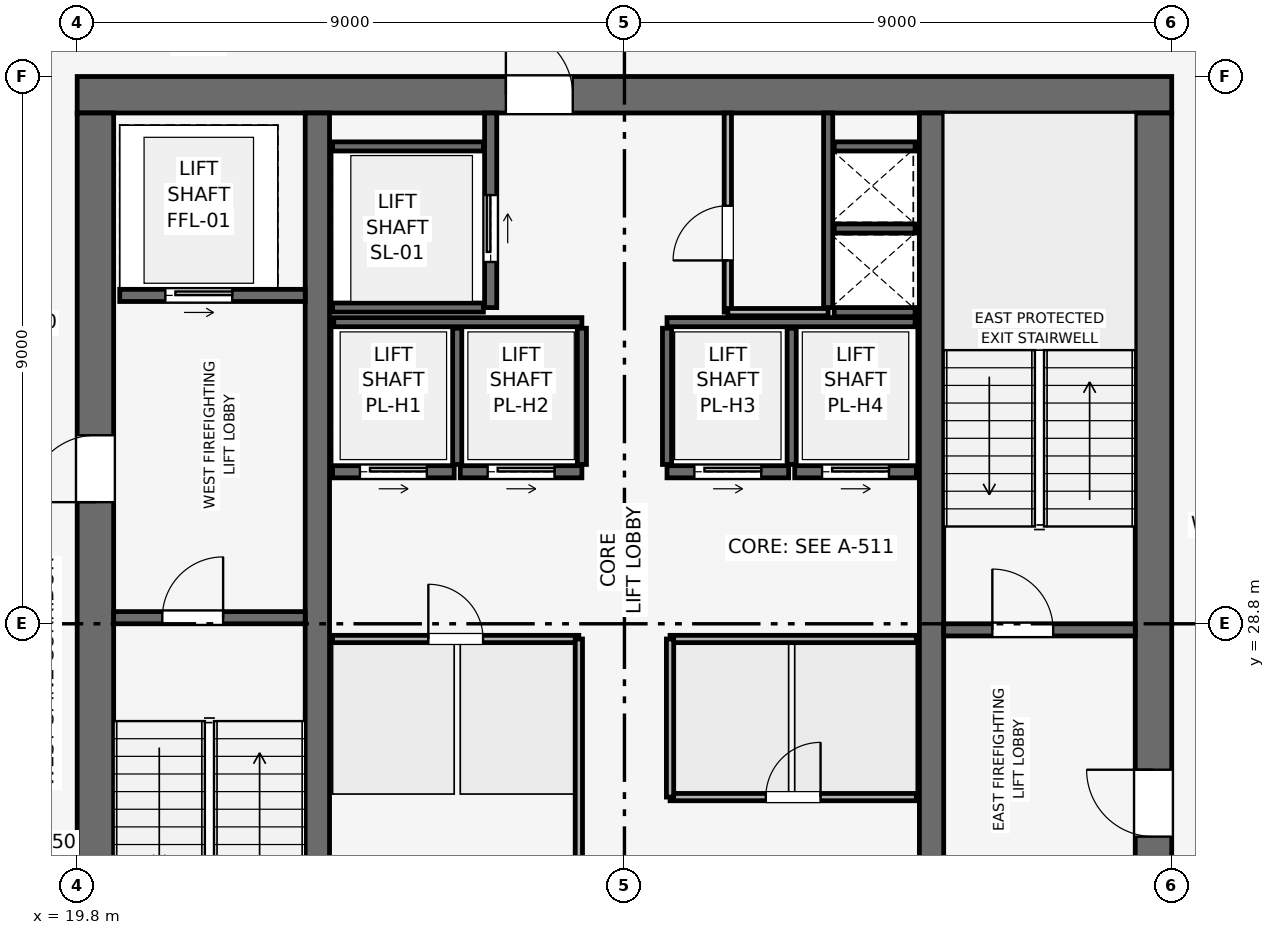
"""IFC4 building model, lengths in metres.
Left out: names, types, materials, properties, quantities, classifications, styles, units other than length and angle.
Written with IfcOpenShell. Run it as: python <this file> out.ifc"""

import sys

from ifc_helpers import new_model, si_unit, direction, frame, frame_2d, origin, place, context, subcontext, project, spatial, rectangle, extrude, element, fill, save


model = new_model("IFC4")
c1 = context("Model", 3, precision=1e-05, world=origin(), true_north=direction((0.0, 1.0)))
c2 = subcontext(c1, "Body", "Model", "MODEL_VIEW")
j1 = project(units=[si_unit("LENGTHUNIT", "METRE"), si_unit("PLANEANGLEUNIT", "RADIAN")], contexts=[c1])
p1 = place(None, origin())
s1 = spatial("IfcSite", under=j1, at=p1, CompositionType="ELEMENT")
p2 = place(p1, origin())
s2 = spatial("IfcBuilding", under=s1, at=p2, CompositionType="ELEMENT")
p3 = place(p2, frame((0.0, 0.0, 314.25)))
s3 = spatial("IfcBuildingStorey", under=s2, at=p3, CompositionType="ELEMENT", Elevation=314.25)
p4 = place(p3, frame((19.8, 37.5, 0.0), z_axis=(0.0, 0.0, 1.0), x_axis=(1.0, 0.0, 0.0)))
e1 = element("IfcWall", 1, at=p4, inside=s3, PredefinedType="SHEAR", context=c2, shape_type="SweptSolid", body=[
    extrude(rectangle(XDim=18.0, YDim=0.6, at=frame_2d((9.0, 0.0))), origin(), (0.0, 0.0, 1.0), 3.75),
])
p5 = place(p4, frame((7.05, 0.0, 0.0)))
e2 = element("IfcOpeningElement", 2, at=p5, cuts=e1, PredefinedType="OPENING", context=c2, shape_type="SweptSolid", body=[
    extrude(rectangle(XDim=1.1, YDim=2.15, at=frame_2d((0.55, 1.075))), frame((0.0, 0.31, 0.0), z_axis=(0.0, -1.0, 0.0), x_axis=(1.0, 0.0, 0.0)), (0.0, 0.0, 1.0), 0.62),
])
p6 = place(p3, frame((20.1, 20.4, 0.0), z_axis=(0.0, 0.0, 1.0), x_axis=(0.0, 1.0, 0.0)))
e3 = element("IfcWall", 3, at=p6, inside=s3, PredefinedType="SHEAR", context=c2, shape_type="SweptSolid", body=[
    extrude(rectangle(XDim=16.8, YDim=0.6, at=frame_2d((8.4, 0.0))), origin(), (0.0, 0.0, 1.0), 3.75),
])
p7 = place(p6, frame((10.4, 0.0, 0.0)))
e4 = element("IfcOpeningElement", 4, at=p7, cuts=e3, PredefinedType="OPENING", context=c2, shape_type="SweptSolid", body=[
    extrude(rectangle(XDim=1.1, YDim=2.15, at=frame_2d((0.55, 1.075))), frame((0.0, 0.31, 0.0), z_axis=(0.0, -1.0, 0.0), x_axis=(1.0, 0.0, 0.0)), (0.0, 0.0, 1.0), 0.62),
])
p8 = place(p3, frame((37.5, 20.4, 0.0), z_axis=(0.0, 0.0, 1.0), x_axis=(0.0, 1.0, 0.0)))
e5 = element("IfcWall", 5, at=p8, inside=s3, PredefinedType="SHEAR", context=c2, shape_type="SweptSolid", body=[
    extrude(rectangle(XDim=16.8, YDim=0.6, at=frame_2d((8.4, 0.0))), origin(), (0.0, 0.0, 1.0), 3.75),
])
p9 = place(p8, frame((4.9, 0.0, 0.0)))
e6 = element("IfcOpeningElement", 6, at=p9, cuts=e5, PredefinedType="OPENING", context=c2, shape_type="SweptSolid", body=[
    extrude(rectangle(XDim=1.1, YDim=2.15, at=frame_2d((0.55, 1.075))), frame((0.0, 0.31, 0.0), z_axis=(0.0, -1.0, 0.0), x_axis=(1.0, 0.0, 0.0)), (0.0, 0.0, 1.0), 0.62),
])
for number, where, z_axis, x_axis in (
    (7, (23.75, 20.4, 0.0), (0.0, 0.0, 1.0), (0.0, 1.0, 0.0)),
    (8, (33.85, 20.4, 0.0), (0.0, 0.0, 1.0), (0.0, 1.0, 0.0)),
):
    element("IfcWall", number, at=place(p3, frame(where, z_axis=z_axis, x_axis=x_axis)), inside=s3, PredefinedType="SHEAR", context=c2, shape_type="SweptSolid", body=[
        extrude(rectangle(XDim=16.8, YDim=0.4, at=frame_2d((8.4, 0.0))), origin(), (0.0, 0.0, 1.0), 3.75),
    ])
p10 = place(p3, frame((20.4, 28.9, 0.0), z_axis=(0.0, 0.0, 1.0), x_axis=(1.0, 0.0, 0.0)))
e9 = element("IfcWall", 9, at=p10, inside=s3, PredefinedType="SHEAR", context=c2, shape_type="SweptSolid", body=[
    extrude(rectangle(XDim=3.15, YDim=0.2, at=frame_2d((1.575, 0.0))), origin(), (0.0, 0.0, 1.0), 3.51),
])
p11 = place(p10, frame((0.8, 0.0, 0.0)))
e10 = element("IfcOpeningElement", 10, at=p11, cuts=e9, PredefinedType="OPENING", context=c2, shape_type="SweptSolid", body=[
    extrude(rectangle(XDim=1.0, YDim=2.1, at=frame_2d((0.5, 1.05))), frame((0.0, 0.11, 0.0), z_axis=(0.0, -1.0, 0.0), x_axis=(1.0, 0.0, 0.0)), (0.0, 0.0, 1.0), 0.22),
])
p12 = place(p3, frame((34.05, 28.7, 0.0), z_axis=(0.0, 0.0, 1.0), x_axis=(1.0, 0.0, 0.0)))
e11 = element("IfcWall", 11, at=p12, inside=s3, PredefinedType="SHEAR", context=c2, shape_type="SweptSolid", body=[
    extrude(rectangle(XDim=3.15, YDim=0.2, at=frame_2d((1.575, 0.0))), origin(), (0.0, 0.0, 1.0), 3.51),
])
p13 = place(p12, frame((0.8, 0.0, 0.0)))
e12 = element("IfcOpeningElement", 12, at=p13, cuts=e11, PredefinedType="OPENING", context=c2, shape_type="SweptSolid", body=[
    extrude(rectangle(XDim=1.0, YDim=2.1, at=frame_2d((0.5, 1.05))), frame((0.0, 0.11, 0.0), z_axis=(0.0, -1.0, 0.0), x_axis=(1.0, 0.0, 0.0)), (0.0, 0.0, 1.0), 0.22),
])
p14 = place(p3, frame((32.15, 34.0, 0.0), z_axis=(0.0, 0.0, 1.0), x_axis=(0.0, 1.0, 0.0)))
e13 = element("IfcWall", 13, at=p14, inside=s3, PredefinedType="SHEAR", context=c2, shape_type="SweptSolid", body=[
    extrude(rectangle(XDim=3.2, YDim=0.15, at=frame_2d((1.6, 0.0))), origin(), (0.0, 0.0, 1.0), 3.51),
])
for number, where, z_axis, x_axis in (
    (14, (32.25, 33.925, 0.0), (0.0, 0.0, 1.0), (1.0, 0.0, 0.0)),
    (15, (32.25, 35.3, 0.0), (0.0, 0.0, 1.0), (1.0, 0.0, 0.0)),
):
    element("IfcWall", number, at=place(p3, frame(where, z_axis=z_axis, x_axis=x_axis)), inside=s3, PredefinedType="SHEAR", context=c2, shape_type="SweptSolid", body=[
        extrude(rectangle(XDim=1.33, YDim=0.15, at=frame_2d((0.665, 0.0))), origin(), (0.0, 0.0, 1.0), 3.51),
    ])
p15 = place(p3, frame((20.5, 34.2, 0.0), z_axis=(0.0, 0.0, 1.0), x_axis=(1.0, 0.0, 0.0)))
e16 = element("IfcWall", 16, at=p15, inside=s3, PredefinedType="SHEAR", context=c2, shape_type="SweptSolid", body=[
    extrude(rectangle(XDim=3.05, YDim=0.2, at=frame_2d((1.525, 0.0))), origin(), (0.0, 0.0, 1.0), 3.51),
])
p16 = place(p15, frame((0.75, 0.0, 0.0)))
e17 = element("IfcOpeningElement", 17, at=p16, cuts=e16, PredefinedType="OPENING", context=c2, shape_type="SweptSolid", body=[
    extrude(rectangle(XDim=1.1, YDim=2.15, at=frame_2d((0.55, 1.075))), frame((0.0, 0.11, 0.0), z_axis=(0.0, -1.0, 0.0), x_axis=(1.0, 0.0, 0.0)), (0.0, 0.0, 1.0), 0.22),
])
p17 = place(p3, frame((26.6, 34.0, 0.0), z_axis=(0.0, 0.0, 1.0), x_axis=(0.0, 1.0, 0.0)))
e18 = element("IfcWall", 18, at=p17, inside=s3, PredefinedType="SHEAR", context=c2, shape_type="SweptSolid", body=[
    extrude(rectangle(XDim=3.2, YDim=0.2, at=frame_2d((1.6, 0.0))), origin(), (0.0, 0.0, 1.0), 3.51),
])
p18 = place(p17, frame((0.75, 0.0, 0.0)))
e19 = element("IfcOpeningElement", 19, at=p18, cuts=e18, PredefinedType="OPENING", context=c2, shape_type="SweptSolid", body=[
    extrude(rectangle(XDim=1.1, YDim=2.15, at=frame_2d((0.55, 1.075))), frame((0.0, 0.11, 0.0), z_axis=(0.0, -1.0, 0.0), x_axis=(1.0, 0.0, 0.0)), (0.0, 0.0, 1.0), 0.22),
])
for number, where, z_axis, x_axis in (
    (20, (24.0, 34.0, 0.0), (0.0, 0.0, 1.0), (1.0, 0.0, 0.0)),
    (21, (24.0, 36.65, 0.0), (0.0, 0.0, 1.0), (1.0, 0.0, 0.0)),
):
    element("IfcWall", number, at=place(p3, frame(where, z_axis=z_axis, x_axis=x_axis)), inside=s3, PredefinedType="SHEAR", context=c2, shape_type="SweptSolid", body=[
        extrude(rectangle(XDim=2.48, YDim=0.15, at=frame_2d((1.24, 0.0))), origin(), (0.0, 0.0, 1.0), 3.51),
    ])
p19 = place(p3, frame((24.0, 31.3, 0.0), z_axis=(0.0, 0.0, 1.0), x_axis=(1.0, 0.0, 0.0)))
e22 = element("IfcWall", 22, at=p19, inside=s3, PredefinedType="SHEAR", context=c2, shape_type="SweptSolid", body=[
    extrude(rectangle(XDim=2.0, YDim=0.2, at=frame_2d((1.0, 0.0))), origin(), (0.0, 0.0, 1.0), 3.51),
])
p20 = place(p19, frame((0.45, 0.0, 0.0)))
e23 = element("IfcOpeningElement", 23, at=p20, cuts=e22, PredefinedType="OPENING", context=c2, shape_type="SweptSolid", body=[
    extrude(rectangle(XDim=1.1, YDim=2.15, at=frame_2d((0.55, 1.075))), frame((0.0, 0.11, 0.0), z_axis=(0.0, -1.0, 0.0), x_axis=(1.0, 0.0, 0.0)), (0.0, 0.0, 1.0), 0.22),
])
p21 = place(p3, frame((26.1, 31.3, 0.0), z_axis=(0.0, 0.0, 1.0), x_axis=(1.0, 0.0, 0.0)))
e24 = element("IfcWall", 24, at=p21, inside=s3, PredefinedType="SHEAR", context=c2, shape_type="SweptSolid", body=[
    extrude(rectangle(XDim=2.0, YDim=0.2, at=frame_2d((1.0, 0.0))), origin(), (0.0, 0.0, 1.0), 3.51),
])
p22 = place(p21, frame((0.45, 0.0, 0.0)))
e25 = element("IfcOpeningElement", 25, at=p22, cuts=e24, PredefinedType="OPENING", context=c2, shape_type="SweptSolid", body=[
    extrude(rectangle(XDim=1.1, YDim=2.15, at=frame_2d((0.55, 1.075))), frame((0.0, 0.11, 0.0), z_axis=(0.0, -1.0, 0.0), x_axis=(1.0, 0.0, 0.0)), (0.0, 0.0, 1.0), 0.22),
])
p23 = place(p3, frame((29.5, 31.3, 0.0), z_axis=(0.0, 0.0, 1.0), x_axis=(1.0, 0.0, 0.0)))
e26 = element("IfcWall", 26, at=p23, inside=s3, PredefinedType="SHEAR", context=c2, shape_type="SweptSolid", body=[
    extrude(rectangle(XDim=2.0, YDim=0.2, at=frame_2d((1.0, 0.0))), origin(), (0.0, 0.0, 1.0), 3.51),
])
p24 = place(p23, frame((0.45, 0.0, 0.0)))
e27 = element("IfcOpeningElement", 27, at=p24, cuts=e26, PredefinedType="OPENING", context=c2, shape_type="SweptSolid", body=[
    extrude(rectangle(XDim=1.1, YDim=2.15, at=frame_2d((0.55, 1.075))), frame((0.0, 0.11, 0.0), z_axis=(0.0, -1.0, 0.0), x_axis=(1.0, 0.0, 0.0)), (0.0, 0.0, 1.0), 0.22),
])
p25 = place(p3, frame((31.6, 31.3, 0.0), z_axis=(0.0, 0.0, 1.0), x_axis=(1.0, 0.0, 0.0)))
e28 = element("IfcWall", 28, at=p25, inside=s3, PredefinedType="SHEAR", context=c2, shape_type="SweptSolid", body=[
    extrude(rectangle(XDim=2.0, YDim=0.2, at=frame_2d((1.0, 0.0))), origin(), (0.0, 0.0, 1.0), 3.51),
])
p26 = place(p25, frame((0.45, 0.0, 0.0)))
e29 = element("IfcOpeningElement", 29, at=p26, cuts=e28, PredefinedType="OPENING", context=c2, shape_type="SweptSolid", body=[
    extrude(rectangle(XDim=1.1, YDim=2.15, at=frame_2d((0.55, 1.075))), frame((0.0, 0.11, 0.0), z_axis=(0.0, -1.0, 0.0), x_axis=(1.0, 0.0, 0.0)), (0.0, 0.0, 1.0), 0.22),
])
p27 = place(p3, frame((32.25, 36.65, 0.0), z_axis=(0.0, 0.0, 1.0), x_axis=(1.0, 0.0, 0.0)))
e30 = element("IfcWall", 30, at=p27, inside=s3, PredefinedType="SHEAR", context=c2, shape_type="SweptSolid", body=[
    extrude(rectangle(XDim=1.33, YDim=0.15, at=frame_2d((0.665, 0.0))), origin(), (0.0, 0.0, 1.0), 3.51),
])
for number, where, z_axis, x_axis in (
    (31, (24.02, 33.76, 0.0), (0.0, 0.0, 1.0), (1.0, 0.0, 0.0)),
    (32, (29.5, 33.76, 0.0), (0.0, 0.0, 1.0), (1.0, 0.0, 0.0)),
):
    element("IfcWall", number, at=place(p3, frame(where, z_axis=z_axis, x_axis=x_axis)), inside=s3, PredefinedType="SHEAR", context=c2, shape_type="SweptSolid", body=[
        extrude(rectangle(XDim=4.08, YDim=0.15, at=frame_2d((2.04, 0.0))), origin(), (0.0, 0.0, 1.0), 3.51),
    ])
for number, where, z_axis, x_axis in (
    (33, (26.05, 31.42, 0.0), (0.0, 0.0, 1.0), (0.0, 1.0, 0.0)),
    (34, (28.1, 31.42, 0.0), (0.0, 0.0, 1.0), (0.0, 1.0, 0.0)),
    (35, (29.5, 31.42, 0.0), (0.0, 0.0, 1.0), (0.0, 1.0, 0.0)),
    (36, (31.55, 31.42, 0.0), (0.0, 0.0, 1.0), (0.0, 1.0, 0.0)),
):
    element("IfcWall", number, at=place(p3, frame(where, z_axis=z_axis, x_axis=x_axis)), inside=s3, PredefinedType="SHEAR", context=c2, shape_type="SweptSolid", body=[
        extrude(rectangle(XDim=2.24, YDim=0.15, at=frame_2d((1.12, 0.0))), origin(), (0.0, 0.0, 1.0), 3.51),
    ])
p28 = place(p3, frame((30.5, 33.925, 0.0), z_axis=(0.0, 0.0, 1.0), x_axis=(0.0, 1.0, 0.0)))
e37 = element("IfcWall", 37, at=p28, inside=s3, PredefinedType="PARTITIONING", context=c2, shape_type="SweptSolid", body=[
    extrude(rectangle(XDim=3.275, YDim=0.12, at=frame_2d((1.637, 0.0))), origin(), (0.0, 0.0, 1.0), 3.51),
])
p29 = place(p28, frame((0.85, 0.0, 0.0)))
e38 = element("IfcOpeningElement", 38, at=p29, cuts=e37, PredefinedType="OPENING", context=c2, shape_type="SweptSolid", body=[
    extrude(rectangle(XDim=0.9, YDim=2.1, at=frame_2d((0.45, 1.05))), frame((0.0, 0.07, 0.0), z_axis=(0.0, -1.0, 0.0), x_axis=(1.0, 0.0, 0.0)), (0.0, 0.0, 1.0), 0.14),
])
p30 = place(p3, frame((30.5, 33.925, 0.0), z_axis=(0.0, 0.0, 1.0), x_axis=(1.0, 0.0, 0.0)))
e39 = element("IfcWall", 39, at=p30, inside=s3, PredefinedType="PARTITIONING", context=c2, shape_type="SweptSolid", body=[
    extrude(rectangle(XDim=1.65, YDim=0.12, at=frame_2d((0.825, 0.0))), origin(), (0.0, 0.0, 1.0), 3.51),
])
p31 = place(p3, frame((24.0, 28.55, 0.0), z_axis=(0.0, 0.0, 1.0), x_axis=(1.0, 0.0, 0.0)))
e40 = element("IfcWall", 40, at=p31, inside=s3, PredefinedType="PARTITIONING", context=c2, shape_type="SweptSolid", body=[
    extrude(rectangle(XDim=4.05, YDim=0.12, at=frame_2d((2.025, 0.0))), origin(), (0.0, 0.0, 1.0), 3.51),
])
p32 = place(p31, frame((1.575, 0.0, 0.0)))
e41 = element("IfcOpeningElement", 41, at=p32, cuts=e40, PredefinedType="OPENING", context=c2, shape_type="SweptSolid", body=[
    extrude(rectangle(XDim=0.9, YDim=2.1, at=frame_2d((0.45, 1.05))), frame((0.0, 0.07, 0.0), z_axis=(0.0, -1.0, 0.0), x_axis=(1.0, 0.0, 0.0)), (0.0, 0.0, 1.0), 0.14),
])
p33 = place(p3, frame((28.05, 20.4, 0.0), z_axis=(0.0, 0.0, 1.0), x_axis=(0.0, 1.0, 0.0)))
e42 = element("IfcWall", 42, at=p33, inside=s3, PredefinedType="PARTITIONING", context=c2, shape_type="SweptSolid", body=[
    extrude(rectangle(XDim=8.15, YDim=0.12, at=frame_2d((4.075, 0.0))), origin(), (0.0, 0.0, 1.0), 3.51),
])
p34 = place(p3, frame((29.55, 25.95, 0.0), z_axis=(0.0, 0.0, 1.0), x_axis=(1.0, 0.0, 0.0)))
e43 = element("IfcWall", 43, at=p34, inside=s3, PredefinedType="PARTITIONING", context=c2, shape_type="SweptSolid", body=[
    extrude(rectangle(XDim=4.05, YDim=0.12, at=frame_2d((2.025, 0.0))), origin(), (0.0, 0.0, 1.0), 3.51),
])
p35 = place(p34, frame((1.575, 0.0, 0.0)))
e44 = element("IfcOpeningElement", 44, at=p35, cuts=e43, PredefinedType="OPENING", context=c2, shape_type="SweptSolid", body=[
    extrude(rectangle(XDim=0.9, YDim=2.1, at=frame_2d((0.45, 1.05))), frame((0.0, 0.07, 0.0), z_axis=(0.0, -1.0, 0.0), x_axis=(1.0, 0.0, 0.0)), (0.0, 0.0, 1.0), 0.14),
])
p36 = place(p3, frame((29.55, 28.55, 0.0), z_axis=(0.0, 0.0, 1.0), x_axis=(1.0, 0.0, 0.0)))
e45 = element("IfcWall", 45, at=p36, inside=s3, PredefinedType="PARTITIONING", context=c2, shape_type="SweptSolid", body=[
    extrude(rectangle(XDim=4.05, YDim=0.12, at=frame_2d((2.025, 0.0))), origin(), (0.0, 0.0, 1.0), 3.51),
])
p37 = place(p3, frame((29.55, 25.95, 0.0), z_axis=(0.0, 0.0, 1.0), x_axis=(0.0, 1.0, 0.0)))
e46 = element("IfcWall", 46, at=p37, inside=s3, PredefinedType="PARTITIONING", context=c2, shape_type="SweptSolid", body=[
    extrude(rectangle(XDim=2.6, YDim=0.12, at=frame_2d((1.3, 0.0))), origin(), (0.0, 0.0, 1.0), 3.51),
])
p38 = place(p11, origin())
e47 = element("IfcDoor", 47, at=p38, inside=s3, OperationType="SINGLE_SWING_RIGHT", PredefinedType="DOOR", context=c2, shape_type="SweptSolid", body=[
    extrude(rectangle(XDim=1.0, YDim=2.1, at=frame_2d((0.5, 1.05))), frame((0.0, 0.025, 0.0), z_axis=(0.0, -1.0, 0.0), x_axis=(1.0, 0.0, 0.0)), (0.0, 0.0, 1.0), 0.05),
])
fill(e10, e47)
p39 = place(p13, origin())
e48 = element("IfcDoor", 48, at=p39, inside=s3, OperationType="SINGLE_SWING_LEFT", PredefinedType="DOOR", context=c2, shape_type="SweptSolid", body=[
    extrude(rectangle(XDim=1.0, YDim=2.1, at=frame_2d((0.5, 1.05))), frame((0.0, 0.025, 0.0), z_axis=(0.0, -1.0, 0.0), x_axis=(1.0, 0.0, 0.0)), (0.0, 0.0, 1.0), 0.05),
])
fill(e12, e48)
p40 = place(p16, origin())
e49 = element("IfcDoor", 49, at=p40, inside=s3, OperationType="SLIDING_TO_RIGHT", PredefinedType="DOOR", context=c2, shape_type="SweptSolid", body=[
    extrude(rectangle(XDim=1.1, YDim=2.15, at=frame_2d((0.55, 1.075))), frame((0.0, 0.025, 0.0), z_axis=(0.0, -1.0, 0.0), x_axis=(1.0, 0.0, 0.0)), (0.0, 0.0, 1.0), 0.05),
])
fill(e17, e49)
p41 = place(p18, origin())
e50 = element("IfcDoor", 50, at=p41, inside=s3, OperationType="SLIDING_TO_RIGHT", PredefinedType="DOOR", context=c2, shape_type="SweptSolid", body=[
    extrude(rectangle(XDim=1.1, YDim=2.15, at=frame_2d((0.55, 1.075))), frame((0.0, 0.025, 0.0), z_axis=(0.0, -1.0, 0.0), x_axis=(1.0, 0.0, 0.0)), (0.0, 0.0, 1.0), 0.05),
])
fill(e19, e50)
p42 = place(p20, origin())
e51 = element("IfcDoor", 51, at=p42, inside=s3, OperationType="SLIDING_TO_RIGHT", PredefinedType="DOOR", context=c2, shape_type="SweptSolid", body=[
    extrude(rectangle(XDim=1.1, YDim=2.15, at=frame_2d((0.55, 1.075))), frame((0.0, 0.025, 0.0), z_axis=(0.0, -1.0, 0.0), x_axis=(1.0, 0.0, 0.0)), (0.0, 0.0, 1.0), 0.05),
])
fill(e23, e51)
p43 = place(p22, origin())
e52 = element("IfcDoor", 52, at=p43, inside=s3, OperationType="SLIDING_TO_RIGHT", PredefinedType="DOOR", context=c2, shape_type="SweptSolid", body=[
    extrude(rectangle(XDim=1.1, YDim=2.15, at=frame_2d((0.55, 1.075))), frame((0.0, 0.025, 0.0), z_axis=(0.0, -1.0, 0.0), x_axis=(1.0, 0.0, 0.0)), (0.0, 0.0, 1.0), 0.05),
])
fill(e25, e52)
p44 = place(p24, origin())
e53 = element("IfcDoor", 53, at=p44, inside=s3, OperationType="SLIDING_TO_RIGHT", PredefinedType="DOOR", context=c2, shape_type="SweptSolid", body=[
    extrude(rectangle(XDim=1.1, YDim=2.15, at=frame_2d((0.55, 1.075))), frame((0.0, 0.025, 0.0), z_axis=(0.0, -1.0, 0.0), x_axis=(1.0, 0.0, 0.0)), (0.0, 0.0, 1.0), 0.05),
])
fill(e27, e53)
p45 = place(p26, origin())
e54 = element("IfcDoor", 54, at=p45, inside=s3, OperationType="SLIDING_TO_RIGHT", PredefinedType="DOOR", context=c2, shape_type="SweptSolid", body=[
    extrude(rectangle(XDim=1.1, YDim=2.15, at=frame_2d((0.55, 1.075))), frame((0.0, 0.025, 0.0), z_axis=(0.0, -1.0, 0.0), x_axis=(1.0, 0.0, 0.0)), (0.0, 0.0, 1.0), 0.05),
])
fill(e29, e54)
p46 = place(p29, origin())
e55 = element("IfcDoor", 55, at=p46, inside=s3, OperationType="SINGLE_SWING_LEFT", PredefinedType="DOOR", context=c2, shape_type="SweptSolid", body=[
    extrude(rectangle(XDim=0.9, YDim=2.1, at=frame_2d((0.45, 1.05))), frame((0.0, 0.025, 0.0), z_axis=(0.0, -1.0, 0.0), x_axis=(1.0, 0.0, 0.0)), (0.0, 0.0, 1.0), 0.05),
])
fill(e38, e55)
p47 = place(p32, origin())
e56 = element("IfcDoor", 56, at=p47, inside=s3, OperationType="SINGLE_SWING_LEFT", PredefinedType="DOOR", context=c2, shape_type="SweptSolid", body=[
    extrude(rectangle(XDim=0.9, YDim=2.1, at=frame_2d((0.45, 1.05))), frame((0.0, 0.025, 0.0), z_axis=(0.0, -1.0, 0.0), x_axis=(1.0, 0.0, 0.0)), (0.0, 0.0, 1.0), 0.05),
])
fill(e41, e56)
p48 = place(p35, origin())
e57 = element("IfcDoor", 57, at=p48, inside=s3, OperationType="SINGLE_SWING_RIGHT", PredefinedType="DOOR", context=c2, shape_type="SweptSolid", body=[
    extrude(rectangle(XDim=0.9, YDim=2.1, at=frame_2d((0.45, 1.05))), frame((0.0, 0.025, 0.0), z_axis=(0.0, -1.0, 0.0), x_axis=(1.0, 0.0, 0.0)), (0.0, 0.0, 1.0), 0.05),
])
fill(e44, e57)
p49 = place(p7, origin())
e58 = element("IfcDoor", 58, at=p49, inside=s3, OperationType="SINGLE_SWING_LEFT", PredefinedType="DOOR", context=c2, shape_type="SweptSolid", body=[
    extrude(rectangle(XDim=1.1, YDim=2.15, at=frame_2d((0.55, 1.075))), frame((0.0, 0.025, 0.0), z_axis=(0.0, -1.0, 0.0), x_axis=(1.0, 0.0, 0.0)), (0.0, 0.0, 1.0), 0.05),
])
fill(e4, e58)
p50 = place(p9, origin())
e59 = element("IfcDoor", 59, at=p50, inside=s3, OperationType="SINGLE_SWING_RIGHT", PredefinedType="DOOR", context=c2, shape_type="SweptSolid", body=[
    extrude(rectangle(XDim=1.1, YDim=2.15, at=frame_2d((0.55, 1.075))), frame((0.0, 0.025, 0.0), z_axis=(0.0, -1.0, 0.0), x_axis=(1.0, 0.0, 0.0)), (0.0, 0.0, 1.0), 0.05),
])
fill(e6, e59)
p51 = place(p5, origin())
e60 = element("IfcDoor", 60, at=p51, inside=s3, OperationType="SINGLE_SWING_LEFT", PredefinedType="DOOR", context=c2, shape_type="SweptSolid", body=[
    extrude(rectangle(XDim=1.1, YDim=2.15, at=frame_2d((0.55, 1.075))), frame((0.0, 0.025, 0.0), z_axis=(0.0, -1.0, 0.0), x_axis=(1.0, 0.0, 0.0)), (0.0, 0.0, 1.0), 0.05),
])
fill(e2, e60)
save(model, sys.argv[1])
